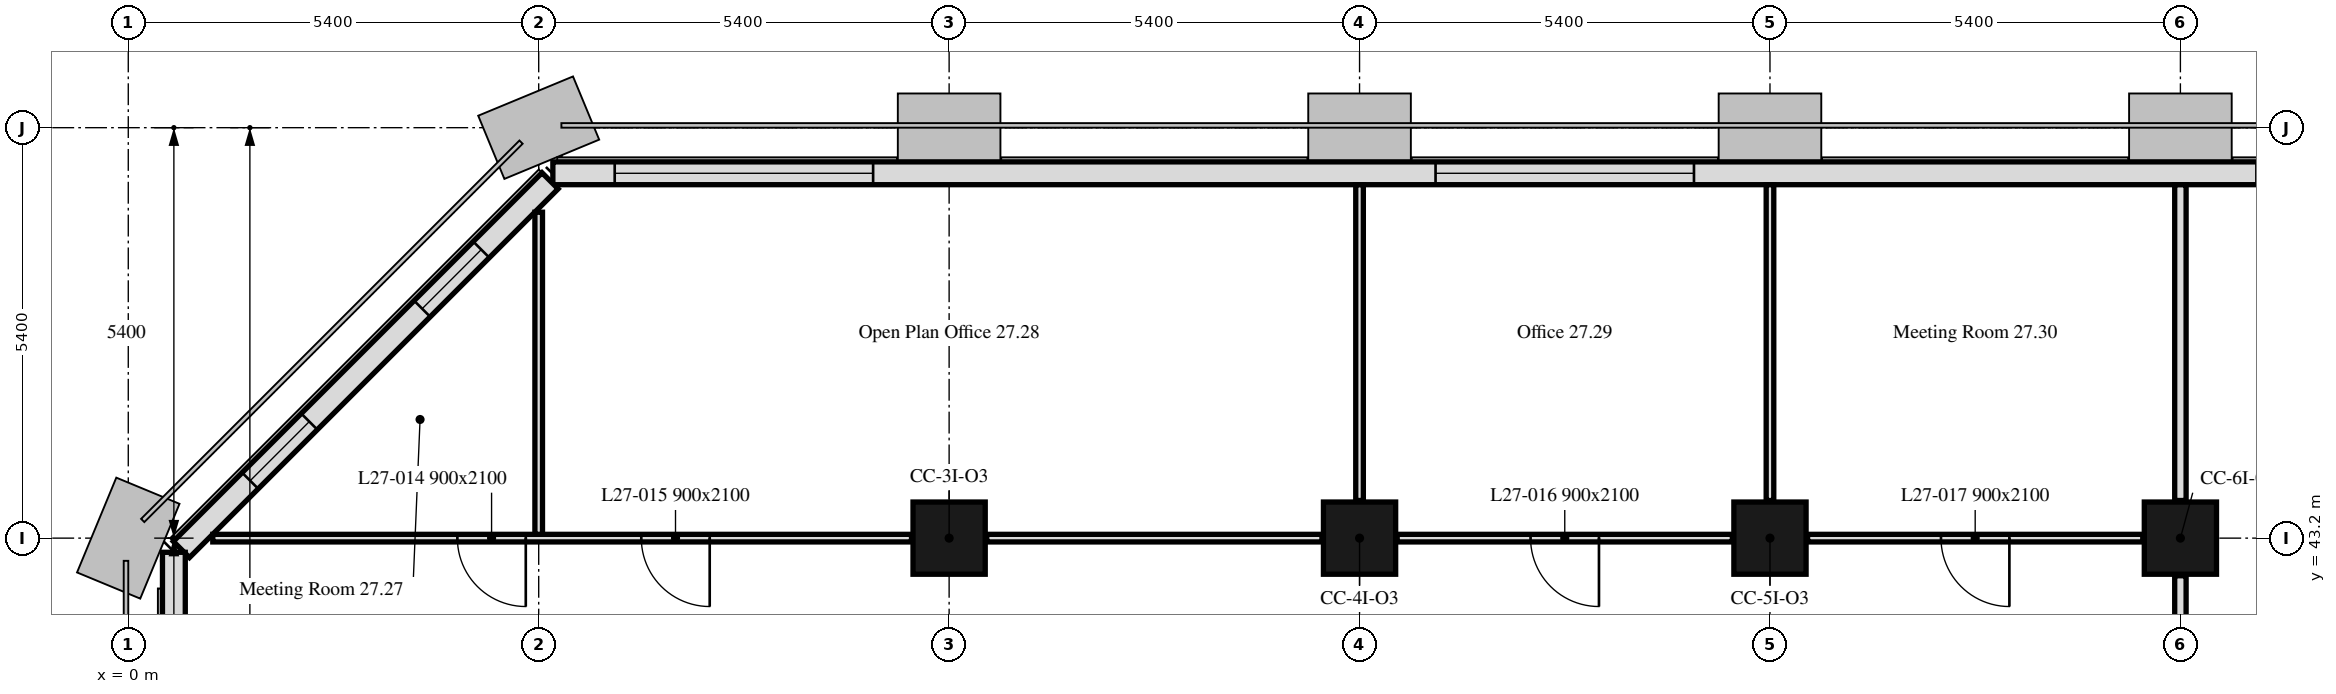
"""IFC4 building model, lengths in metres.
Left out: names, types, materials, properties, quantities, classifications, styles, units other than length and angle.
Written with IfcOpenShell. Run it as: python <this file> out.ifc"""

import sys

from ifc_helpers import new_model, si_unit, direction, frame, frame_2d, origin, origin_2d, place, context, subcontext, project, spatial, rectangle, extrude, element, fill, save


model = new_model("IFC4")
c1 = context("Model", 3, precision=1e-05, world=origin(), true_north=direction((0.0, 1.0)))
c2 = subcontext(c1, "Body", "Model", "MODEL_VIEW")
j1 = project(units=[si_unit("LENGTHUNIT", "METRE"), si_unit("PLANEANGLEUNIT", "RADIAN")], contexts=[c1])
p1 = place(None, origin())
s1 = spatial("IfcSite", under=j1, at=p1, CompositionType="ELEMENT")
p2 = place(p1, origin())
s2 = spatial("IfcBuilding", under=s1, at=p2, CompositionType="ELEMENT")
p3 = place(p2, frame((0.0, 0.0, 114.4)))
s3 = spatial("IfcBuildingStorey", under=s2, at=p3, CompositionType="ELEMENT", Elevation=114.4)
for number, where, z_axis, x_axis in (
    (1, (10.8, 43.2, 0.0), (0.0, 0.0, 1.0), (1.0, 0.0, 0.0)),
    (2, (16.2, 43.2, 0.0), (0.0, 0.0, 1.0), (1.0, 0.0, 0.0)),
    (3, (21.6, 43.2, 0.0), (0.0, 0.0, 1.0), (1.0, 0.0, 0.0)),
    (4, (27.0, 43.2, 0.0), (0.0, 0.0, 1.0), (1.0, 0.0, 0.0)),
):
    element("IfcColumn", number, at=place(p3, frame(where, z_axis=z_axis, x_axis=x_axis)), inside=s3, PredefinedType="COLUMN", context=c2, shape_type="SweptSolid", body=[
        extrude(rectangle(XDim=0.95, YDim=0.95, at=origin_2d()), origin(), (0.0, 0.0, 1.0), 3.5),
    ])
p4 = place(p3, frame((37.614, 48.0, 0.0), z_axis=(0.0, 0.0, 1.0), x_axis=(-1.0, 0.0, 0.0)))
e5 = element("IfcWall", 5, at=p4, inside=s3, PredefinedType="SOLIDWALL", context=c2, shape_type="SweptSolid", body=[
    extrude(rectangle(XDim=32.027, YDim=0.3, at=frame_2d((16.014, 0.0))), origin(), (0.0, 0.0, 1.0), 3.5),
])
p5 = place(p4, frame((6.214, 0.0, 0.9)))
e6 = element("IfcOpeningElement", 6, at=p5, cuts=e5, PredefinedType="OPENING", context=c2, shape_type="SweptSolid", body=[
    extrude(rectangle(XDim=3.4, YDim=1.7, at=frame_2d((1.7, 0.85))), frame((0.0, 0.16, 0.0), z_axis=(0.0, -1.0, 0.0), x_axis=(1.0, 0.0, 0.0)), (0.0, 0.0, 1.0), 0.32),
])
p6 = place(p4, frame((17.014, 0.0, 0.9)))
e7 = element("IfcOpeningElement", 7, at=p6, cuts=e5, PredefinedType="OPENING", context=c2, shape_type="SweptSolid", body=[
    extrude(rectangle(XDim=3.4, YDim=1.7, at=frame_2d((1.7, 0.85))), frame((0.0, 0.16, 0.0), z_axis=(0.0, -1.0, 0.0), x_axis=(1.0, 0.0, 0.0)), (0.0, 0.0, 1.0), 0.32),
])
p7 = place(p4, frame((27.814, 0.0, 0.9)))
e8 = element("IfcOpeningElement", 8, at=p7, cuts=e5, PredefinedType="OPENING", context=c2, shape_type="SweptSolid", body=[
    extrude(rectangle(XDim=3.4, YDim=1.7, at=frame_2d((1.7, 0.85))), frame((0.0, 0.16, 0.0), z_axis=(0.0, -1.0, 0.0), x_axis=(1.0, 0.0, 0.0)), (0.0, 0.0, 1.0), 0.32),
])
p8 = place(p3, frame((5.55, 47.901, 0.0), z_axis=(0.0, 0.0, 1.0), x_axis=(-0.707106781187, -0.707106781187, 0.0)))
e9 = element("IfcWall", 9, at=p8, inside=s3, PredefinedType="SOLIDWALL", context=c2, shape_type="SweptSolid", body=[
    extrude(rectangle(XDim=6.86, YDim=0.3, at=frame_2d((3.43, 0.0))), origin(), (0.0, 0.0, 1.0), 3.5),
])
p9 = place(p8, frame((1.28, 0.0, 0.9)))
e10 = element("IfcOpeningElement", 10, at=p9, cuts=e9, PredefinedType="OPENING", context=c2, shape_type="SweptSolid", body=[
    extrude(rectangle(XDim=1.1, YDim=1.7, at=frame_2d((0.55, 0.85))), frame((0.0, 0.16, 0.0), z_axis=(0.0, -1.0, 0.0), x_axis=(1.0, 0.0, 0.0)), (0.0, 0.0, 1.0), 0.32),
])
p10 = place(p8, frame((4.48, 0.0, 0.9)))
e11 = element("IfcOpeningElement", 11, at=p10, cuts=e9, PredefinedType="OPENING", context=c2, shape_type="SweptSolid", body=[
    extrude(rectangle(XDim=1.1, YDim=1.7, at=frame_2d((0.55, 0.85))), frame((0.0, 0.16, 0.0), z_axis=(0.0, -1.0, 0.0), x_axis=(1.0, 0.0, 0.0)), (0.0, 0.0, 1.0), 0.32),
])
p11 = place(p3, frame((0.6, 43.014, 0.0), z_axis=(0.0, 0.0, 1.0), x_axis=(0.0, -1.0, 0.0)))
e12 = element("IfcWall", 12, at=p11, inside=s3, PredefinedType="SOLIDWALL", context=c2, shape_type="SweptSolid", body=[
    extrude(rectangle(XDim=32.027, YDim=0.3, at=frame_2d((16.014, 0.0))), origin(), (0.0, 0.0, 1.0), 3.5),
])
p12 = place(p11, frame((6.564, 0.0, 0.9)))
e13 = element("IfcOpeningElement", 13, at=p12, cuts=e12, PredefinedType="OPENING", context=c2, shape_type="SweptSolid", body=[
    extrude(rectangle(XDim=1.1, YDim=1.7, at=frame_2d((0.55, 0.85))), frame((0.0, 0.16, 0.0), z_axis=(0.0, -1.0, 0.0), x_axis=(1.0, 0.0, 0.0)), (0.0, 0.0, 1.0), 0.32),
])
p13 = place(p11, frame((8.164, 0.0, 0.9)))
e14 = element("IfcOpeningElement", 14, at=p13, cuts=e12, PredefinedType="OPENING", context=c2, shape_type="SweptSolid", body=[
    extrude(rectangle(XDim=1.1, YDim=1.7, at=frame_2d((0.55, 0.85))), frame((0.0, 0.16, 0.0), z_axis=(0.0, -1.0, 0.0), x_axis=(1.0, 0.0, 0.0)), (0.0, 0.0, 1.0), 0.32),
])
p14 = place(p11, frame((17.014, 0.0, 0.9)))
e15 = element("IfcOpeningElement", 15, at=p14, cuts=e12, PredefinedType="OPENING", context=c2, shape_type="SweptSolid", body=[
    extrude(rectangle(XDim=3.4, YDim=1.7, at=frame_2d((1.7, 0.85))), frame((0.0, 0.16, 0.0), z_axis=(0.0, -1.0, 0.0), x_axis=(1.0, 0.0, 0.0)), (0.0, 0.0, 1.0), 0.32),
])
p15 = place(p11, frame((28.164, 0.0, 0.9)))
e16 = element("IfcOpeningElement", 16, at=p15, cuts=e12, PredefinedType="OPENING", context=c2, shape_type="SweptSolid", body=[
    extrude(rectangle(XDim=1.1, YDim=1.7, at=frame_2d((0.55, 0.85))), frame((0.0, 0.16, 0.0), z_axis=(0.0, -1.0, 0.0), x_axis=(1.0, 0.0, 0.0)), (0.0, 0.0, 1.0), 0.32),
])
p16 = place(p11, frame((29.764, 0.0, 0.9)))
e17 = element("IfcOpeningElement", 17, at=p16, cuts=e12, PredefinedType="OPENING", context=c2, shape_type="SweptSolid", body=[
    extrude(rectangle(XDim=1.1, YDim=1.7, at=frame_2d((0.55, 0.85))), frame((0.0, 0.16, 0.0), z_axis=(0.0, -1.0, 0.0), x_axis=(1.0, 0.0, 0.0)), (0.0, 0.0, 1.0), 0.32),
])
p17 = place(p3, frame((26.505, 43.2, 0.0), z_axis=(0.0, 0.0, 1.0), x_axis=(-1.0, 0.0, 0.0)))
e18 = element("IfcWall", 18, at=p17, inside=s3, PredefinedType="PARTITIONING", context=c2, shape_type="SweptSolid", body=[
    extrude(rectangle(XDim=4.41, YDim=0.1, at=frame_2d((2.205, 0.0))), origin(), (0.0, 0.0, 1.0), 3.5),
])
p18 = place(p17, frame((1.755, 0.0, 0.0)))
e19 = element("IfcOpeningElement", 19, at=p18, cuts=e18, PredefinedType="OPENING", context=c2, shape_type="SweptSolid", body=[
    extrude(rectangle(XDim=0.9, YDim=2.1, at=frame_2d((0.45, 1.05))), frame((0.0, 0.05, 0.0), z_axis=(0.0, -1.0, 0.0), x_axis=(1.0, 0.0, 0.0)), (0.0, 0.0, 1.0), 0.1),
])
p19 = place(p3, frame((21.105, 43.2, 0.0), z_axis=(0.0, 0.0, 1.0), x_axis=(-1.0, 0.0, 0.0)))
e20 = element("IfcWall", 20, at=p19, inside=s3, PredefinedType="PARTITIONING", context=c2, shape_type="SweptSolid", body=[
    extrude(rectangle(XDim=4.41, YDim=0.1, at=frame_2d((2.205, 0.0))), origin(), (0.0, 0.0, 1.0), 3.5),
])
p20 = place(p19, frame((1.755, 0.0, 0.0)))
e21 = element("IfcOpeningElement", 21, at=p20, cuts=e20, PredefinedType="OPENING", context=c2, shape_type="SweptSolid", body=[
    extrude(rectangle(XDim=0.9, YDim=2.1, at=frame_2d((0.45, 1.05))), frame((0.0, 0.05, 0.0), z_axis=(0.0, -1.0, 0.0), x_axis=(1.0, 0.0, 0.0)), (0.0, 0.0, 1.0), 0.1),
])
p21 = place(p3, frame((15.705, 43.2, 0.0), z_axis=(0.0, 0.0, 1.0), x_axis=(-1.0, 0.0, 0.0)))
e22 = element("IfcWall", 22, at=p21, inside=s3, PredefinedType="PARTITIONING", context=c2, shape_type="SweptSolid", body=[
    extrude(rectangle(XDim=4.41, YDim=0.1, at=frame_2d((2.205, 0.0))), origin(), (0.0, 0.0, 1.0), 3.5),
])
p22 = place(p3, frame((10.305, 43.2, 0.0), z_axis=(0.0, 0.0, 1.0), x_axis=(-1.0, 0.0, 0.0)))
e23 = element("IfcWall", 23, at=p22, inside=s3, PredefinedType="PARTITIONING", context=c2, shape_type="SweptSolid", body=[
    extrude(rectangle(XDim=9.193, YDim=0.1, at=frame_2d((4.596, 0.0))), origin(), (0.0, 0.0, 1.0), 3.5),
])
p23 = place(p22, frame((5.075, 0.0, 0.0)))
e24 = element("IfcOpeningElement", 24, at=p23, cuts=e23, PredefinedType="OPENING", context=c2, shape_type="SweptSolid", body=[
    extrude(rectangle(XDim=0.9, YDim=2.1, at=frame_2d((0.45, 1.05))), frame((0.0, 0.05, 0.0), z_axis=(0.0, -1.0, 0.0), x_axis=(1.0, 0.0, 0.0)), (0.0, 0.0, 1.0), 0.1),
])
p24 = place(p22, frame((2.655, 0.0, 0.0)))
e25 = element("IfcOpeningElement", 25, at=p24, cuts=e23, PredefinedType="OPENING", context=c2, shape_type="SweptSolid", body=[
    extrude(rectangle(XDim=0.9, YDim=2.1, at=frame_2d((0.45, 1.05))), frame((0.0, 0.05, 0.0), z_axis=(0.0, -1.0, 0.0), x_axis=(1.0, 0.0, 0.0)), (0.0, 0.0, 1.0), 0.1),
])
p25 = place(p3, frame((27.0, 38.295, 0.0), z_axis=(0.0, 0.0, 1.0), x_axis=(0.0, 1.0, 0.0)))
e26 = element("IfcWall", 26, at=p25, inside=s3, PredefinedType="PARTITIONING", context=c2, shape_type="SweptSolid", body=[
    extrude(rectangle(XDim=4.41, YDim=0.15, at=frame_2d((2.205, 0.0))), origin(), (0.0, 0.0, 1.0), 2.75),
])
p26 = place(p3, frame((5.4, 43.25, 0.0), z_axis=(0.0, 0.0, 1.0), x_axis=(0.0, 1.0, 0.0)))
e27 = element("IfcWall", 27, at=p26, inside=s3, PredefinedType="PARTITIONING", context=c2, shape_type="SweptSolid", body=[
    extrude(rectangle(XDim=4.238, YDim=0.1, at=frame_2d((2.119, 0.0))), origin(), (0.0, 0.0, 1.0), 3.5),
])
for number, where, z_axis, x_axis in (
    (28, (16.2, 43.695, 0.0), (0.0, 0.0, 1.0), (0.0, 1.0, 0.0)),
    (29, (21.6, 43.695, 0.0), (0.0, 0.0, 1.0), (0.0, 1.0, 0.0)),
):
    element("IfcWall", number, at=place(p3, frame(where, z_axis=z_axis, x_axis=x_axis)), inside=s3, PredefinedType="PARTITIONING", context=c2, shape_type="SweptSolid", body=[
        extrude(rectangle(XDim=4.154, YDim=0.1, at=frame_2d((2.077, 0.0))), origin(), (0.0, 0.0, 1.0), 2.75),
    ])
p27 = place(p3, frame((27.0, 43.695, 0.0), z_axis=(0.0, 0.0, 1.0), x_axis=(0.0, 1.0, 0.0)))
e30 = element("IfcWall", 30, at=p27, inside=s3, PredefinedType="PARTITIONING", context=c2, shape_type="SweptSolid", body=[
    extrude(rectangle(XDim=4.154, YDim=0.15, at=frame_2d((2.077, 0.0))), origin(), (0.0, 0.0, 1.0), 2.75),
])
p28 = place(p6, origin())
e31 = element("IfcWindow", 31, at=p28, inside=s3, PartitioningType="SINGLE_PANEL", PredefinedType="WINDOW", context=c2, shape_type="SweptSolid", body=[
    extrude(rectangle(XDim=3.4, YDim=1.7, at=frame_2d((1.7, 0.85))), frame((0.0, 0.03, 0.0), z_axis=(0.0, -1.0, 0.0), x_axis=(1.0, 0.0, 0.0)), (0.0, 0.0, 1.0), 0.06),
])
fill(e7, e31)
p29 = place(p7, origin())
e32 = element("IfcWindow", 32, at=p29, inside=s3, PartitioningType="SINGLE_PANEL", PredefinedType="WINDOW", context=c2, shape_type="SweptSolid", body=[
    extrude(rectangle(XDim=3.4, YDim=1.7, at=frame_2d((1.7, 0.85))), frame((0.0, 0.03, 0.0), z_axis=(0.0, -1.0, 0.0), x_axis=(1.0, 0.0, 0.0)), (0.0, 0.0, 1.0), 0.06),
])
fill(e8, e32)
p30 = place(p9, origin())
e33 = element("IfcWindow", 33, at=p30, inside=s3, PartitioningType="SINGLE_PANEL", PredefinedType="WINDOW", context=c2, shape_type="SweptSolid", body=[
    extrude(rectangle(XDim=1.1, YDim=1.7, at=frame_2d((0.55, 0.85))), frame((0.0, 0.03, 0.0), z_axis=(0.0, -1.0, 0.0), x_axis=(1.0, 0.0, 0.0)), (0.0, 0.0, 1.0), 0.06),
])
fill(e10, e33)
p31 = place(p10, origin())
e34 = element("IfcWindow", 34, at=p31, inside=s3, PartitioningType="SINGLE_PANEL", PredefinedType="WINDOW", context=c2, shape_type="SweptSolid", body=[
    extrude(rectangle(XDim=1.1, YDim=1.7, at=frame_2d((0.55, 0.85))), frame((0.0, 0.03, 0.0), z_axis=(0.0, -1.0, 0.0), x_axis=(1.0, 0.0, 0.0)), (0.0, 0.0, 1.0), 0.06),
])
fill(e11, e34)
p32 = place(p23, origin())
e35 = element("IfcDoor", 35, at=p32, inside=s3, OperationType="SINGLE_SWING_LEFT", PredefinedType="DOOR", context=c2, shape_type="SweptSolid", body=[
    extrude(rectangle(XDim=0.9, YDim=2.1, at=frame_2d((0.45, 1.05))), frame((0.0, 0.025, 0.0), z_axis=(0.0, -1.0, 0.0), x_axis=(1.0, 0.0, 0.0)), (0.0, 0.0, 1.0), 0.05),
])
fill(e24, e35)
p33 = place(p24, origin())
e36 = element("IfcDoor", 36, at=p33, inside=s3, OperationType="SINGLE_SWING_LEFT", PredefinedType="DOOR", context=c2, shape_type="SweptSolid", body=[
    extrude(rectangle(XDim=0.9, YDim=2.1, at=frame_2d((0.45, 1.05))), frame((0.0, 0.025, 0.0), z_axis=(0.0, -1.0, 0.0), x_axis=(1.0, 0.0, 0.0)), (0.0, 0.0, 1.0), 0.05),
])
fill(e25, e36)
p34 = place(p20, origin())
e37 = element("IfcDoor", 37, at=p34, inside=s3, OperationType="SINGLE_SWING_LEFT", PredefinedType="DOOR", context=c2, shape_type="SweptSolid", body=[
    extrude(rectangle(XDim=0.9, YDim=2.1, at=frame_2d((0.45, 1.05))), frame((0.0, 0.025, 0.0), z_axis=(0.0, -1.0, 0.0), x_axis=(1.0, 0.0, 0.0)), (0.0, 0.0, 1.0), 0.05),
])
fill(e21, e37)
p35 = place(p18, origin())
e38 = element("IfcDoor", 38, at=p35, inside=s3, OperationType="SINGLE_SWING_LEFT", PredefinedType="DOOR", context=c2, shape_type="SweptSolid", body=[
    extrude(rectangle(XDim=0.9, YDim=2.1, at=frame_2d((0.45, 1.05))), frame((0.0, 0.025, 0.0), z_axis=(0.0, -1.0, 0.0), x_axis=(1.0, 0.0, 0.0)), (0.0, 0.0, 1.0), 0.05),
])
fill(e19, e38)
save(model, sys.argv[1])
